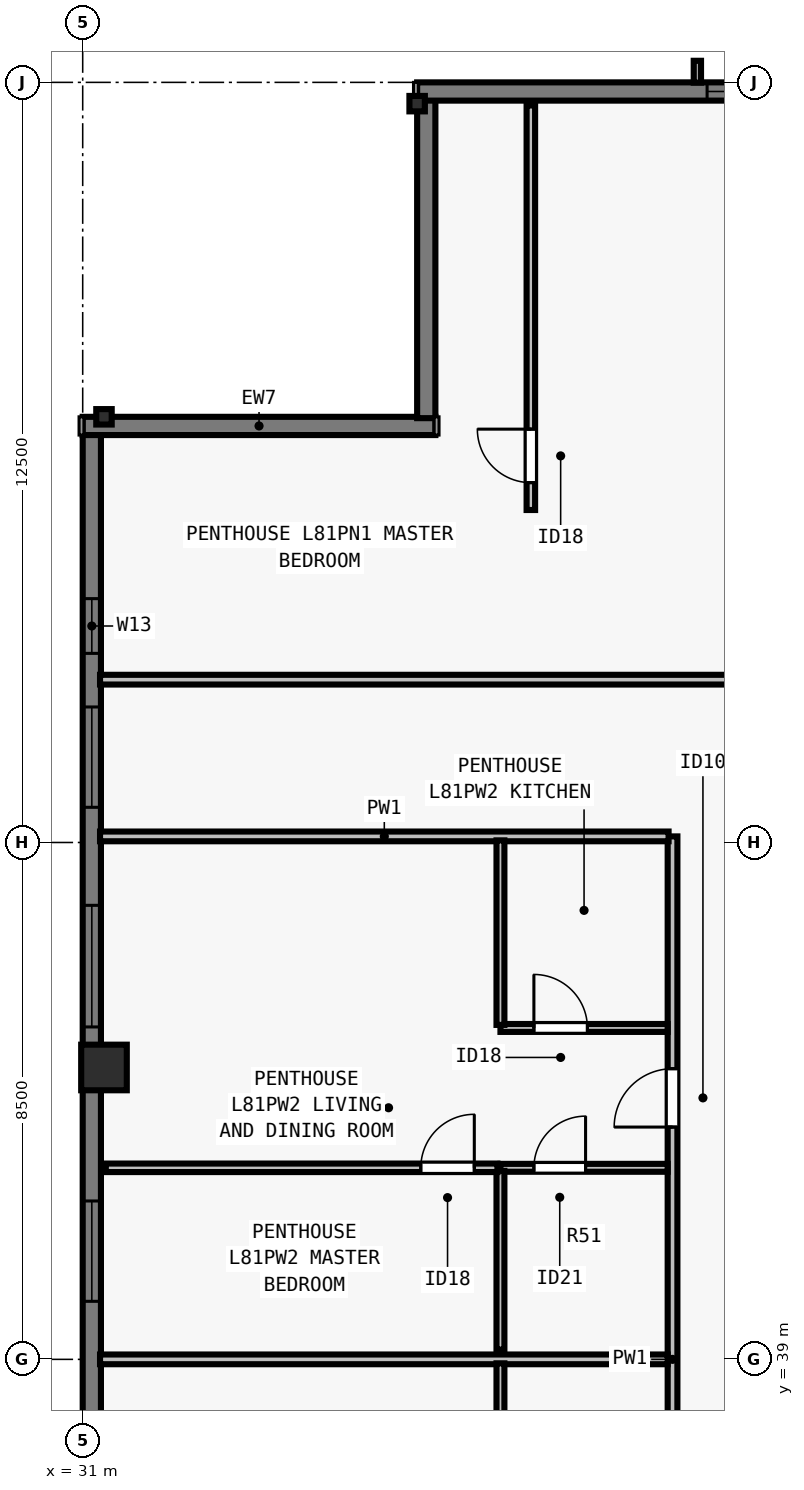
"""IFC4 building model, lengths in metres.
Left out: names, types, materials, properties, quantities, classifications, styles, units other than length and angle.
Written with IfcOpenShell. Run it as: python <this file> out.ifc"""

import sys

from ifc_helpers import new_model, si_unit, direction, frame, frame_2d, origin, origin_2d, place, context, subcontext, project, spatial, rectangle, i_section, extrude, element, fill, save


model = new_model("IFC4")
c1 = context("Model", 3, precision=1e-05, world=origin(), true_north=direction((0.0, 1.0)))
c2 = subcontext(c1, "Body", "Model", "MODEL_VIEW")
j1 = project(units=[si_unit("LENGTHUNIT", "METRE"), si_unit("PLANEANGLEUNIT", "RADIAN")], contexts=[c1])
p1 = place(None, origin())
s1 = spatial("IfcSite", under=j1, at=p1, CompositionType="ELEMENT")
p2 = place(p1, origin())
s2 = spatial("IfcBuilding", under=s1, at=p2, CompositionType="ELEMENT")
p3 = place(p2, frame((0.0, 0.0, 294.5)))
s3 = spatial("IfcBuildingStorey", under=s2, at=p3, CompositionType="ELEMENT", Elevation=294.5)
for number, where, z_axis, x_axis in (
    (1, (36.5, 59.65, 0.0), (0.0, 0.0, 1.0), (1.0, 0.0, 0.0)),
    (2, (31.35, 54.5, 0.0), (0.0, 0.0, 1.0), (0.0, 1.0, 0.0)),
):
    element("IfcColumn", number, at=place(p3, frame(where, z_axis=z_axis, x_axis=x_axis)), inside=s3, PredefinedType="COLUMN", context=c2, shape_type="SweptSolid", body=[
        extrude(i_section(OverallWidth=0.254, OverallDepth=0.254, WebThickness=0.009, FlangeThickness=0.014, FilletRadius=0.013, at=origin_2d()), origin(), (0.0, 0.0, 1.0), 3.5),
    ])
p4 = place(p3, frame((31.35, 43.8, 0.0), z_axis=(0.0, 0.0, 1.0), x_axis=(0.0, 1.0, 0.0)))
e3 = element("IfcColumn", 3, at=p4, inside=s3, PredefinedType="COLUMN", context=c2, shape_type="SweptSolid", body=[
    extrude(rectangle(XDim=0.75, YDim=0.75, at=origin_2d()), origin(), (0.0, 0.0, 1.0), 3.5),
])
p5 = place(p3, frame((31.15, 23.5, 0.0), z_axis=(0.0, 0.0, 1.0), x_axis=(0.0, 1.0, 0.0)))
e4 = element("IfcWall", 4, at=p5, inside=s3, PredefinedType="SOLIDWALL", context=c2, shape_type="SweptSolid", body=[
    extrude(rectangle(XDim=30.722, YDim=0.3, at=frame_2d((15.361, 0.0))), origin(), (0.0, 0.0, 1.0), 3.29),
])
p6 = place(p5, frame((7.93, 0.0, 0.8)))
e5 = element("IfcOpeningElement", 5, at=p6, cuts=e4, PredefinedType="OPENING", context=c2, shape_type="SweptSolid", body=[
    extrude(rectangle(XDim=1.65, YDim=1.758, at=frame_2d((0.825, 0.879))), frame((0.0, 0.16, 0.0), z_axis=(0.0, -1.0, 0.0), x_axis=(1.0, 0.0, 0.0)), (0.0, 0.0, 1.0), 0.32),
])
p7 = place(p5, frame((12.442, 0.0, 0.8)))
e6 = element("IfcOpeningElement", 6, at=p7, cuts=e4, PredefinedType="OPENING", context=c2, shape_type="SweptSolid", body=[
    extrude(rectangle(XDim=2.0, YDim=1.758, at=frame_2d((1.0, 0.879))), frame((0.0, 0.16, 0.0), z_axis=(0.0, -1.0, 0.0), x_axis=(1.0, 0.0, 0.0)), (0.0, 0.0, 1.0), 0.32),
])
p8 = place(p5, frame((16.455, 0.0, 0.8)))
e7 = element("IfcOpeningElement", 7, at=p8, cuts=e4, PredefinedType="OPENING", context=c2, shape_type="SweptSolid", body=[
    extrude(rectangle(XDim=1.65, YDim=1.758, at=frame_2d((0.825, 0.879))), frame((0.0, 0.16, 0.0), z_axis=(0.0, -1.0, 0.0), x_axis=(1.0, 0.0, 0.0)), (0.0, 0.0, 1.0), 0.32),
])
p9 = place(p5, frame((20.967, 0.0, 0.8)))
e8 = element("IfcOpeningElement", 8, at=p9, cuts=e4, PredefinedType="OPENING", context=c2, shape_type="SweptSolid", body=[
    extrude(rectangle(XDim=2.0, YDim=1.758, at=frame_2d((1.0, 0.879))), frame((0.0, 0.16, 0.0), z_axis=(0.0, -1.0, 0.0), x_axis=(1.0, 0.0, 0.0)), (0.0, 0.0, 1.0), 0.32),
])
p10 = place(p5, frame((24.579, 0.0, 0.8)))
e9 = element("IfcOpeningElement", 9, at=p10, cuts=e4, PredefinedType="OPENING", context=c2, shape_type="SweptSolid", body=[
    extrude(rectangle(XDim=1.65, YDim=1.758, at=frame_2d((0.825, 0.879))), frame((0.0, 0.16, 0.0), z_axis=(0.0, -1.0, 0.0), x_axis=(1.0, 0.0, 0.0)), (0.0, 0.0, 1.0), 0.32),
])
p11 = place(p5, frame((27.11, 0.0, 0.8)))
e10 = element("IfcOpeningElement", 10, at=p11, cuts=e4, PredefinedType="OPENING", context=c2, shape_type="SweptSolid", body=[
    extrude(rectangle(XDim=0.9, YDim=1.75, at=frame_2d((0.45, 0.875))), frame((0.0, 0.16, 0.0), z_axis=(0.0, -1.0, 0.0), x_axis=(1.0, 0.0, 0.0)), (0.0, 0.0, 1.0), 0.32),
])
p12 = place(p3, frame((31.0, 54.35, 0.0), z_axis=(0.0, 0.0, 1.0), x_axis=(1.0, 0.0, 0.0)))
e11 = element("IfcWall", 11, at=p12, inside=s3, PredefinedType="SOLIDWALL", context=c2, shape_type="SweptSolid", body=[
    extrude(rectangle(XDim=5.8, YDim=0.3, at=frame_2d((2.9, 0.0))), origin(), (0.0, 0.0, 1.0), 3.29),
])
p13 = place(p3, frame((36.65, 54.478, 0.0), z_axis=(0.0, 0.0, 1.0), x_axis=(0.0, 1.0, 0.0)))
e12 = element("IfcWall", 12, at=p13, inside=s3, PredefinedType="SOLIDWALL", context=c2, shape_type="SweptSolid", body=[
    extrude(rectangle(XDim=5.244, YDim=0.3, at=frame_2d((2.622, 0.0))), origin(), (0.0, 0.0, 1.0), 3.29),
])
p14 = place(p3, frame((36.5, 59.85, 0.0), z_axis=(0.0, 0.0, 1.0), x_axis=(1.0, 0.0, 0.0)))
e13 = element("IfcWall", 13, at=p14, inside=s3, PredefinedType="SOLIDWALL", context=c2, shape_type="SweptSolid", body=[
    extrude(rectangle(XDim=30.722, YDim=0.3, at=frame_2d((15.361, 0.0))), origin(), (0.0, 0.0, 1.0), 3.29),
])
p15 = place(p14, frame((4.769, 0.0, 0.8)))
e14 = element("IfcOpeningElement", 14, at=p15, cuts=e13, PredefinedType="OPENING", context=c2, shape_type="SweptSolid", body=[
    extrude(rectangle(XDim=2.0, YDim=1.758, at=frame_2d((1.0, 0.879))), frame((0.0, 0.16, 0.0), z_axis=(0.0, -1.0, 0.0), x_axis=(1.0, 0.0, 0.0)), (0.0, 0.0, 1.0), 0.32),
])
p16 = place(p14, frame((8.331, 0.0, 0.8)))
e15 = element("IfcOpeningElement", 15, at=p16, cuts=e13, PredefinedType="OPENING", context=c2, shape_type="SweptSolid", body=[
    extrude(rectangle(XDim=1.65, YDim=1.758, at=frame_2d((0.825, 0.879))), frame((0.0, 0.16, 0.0), z_axis=(0.0, -1.0, 0.0), x_axis=(1.0, 0.0, 0.0)), (0.0, 0.0, 1.0), 0.32),
])
p17 = place(p14, frame((12.442, 0.0, 0.8)))
e16 = element("IfcOpeningElement", 16, at=p17, cuts=e13, PredefinedType="OPENING", context=c2, shape_type="SweptSolid", body=[
    extrude(rectangle(XDim=2.0, YDim=1.758, at=frame_2d((1.0, 0.879))), frame((0.0, 0.16, 0.0), z_axis=(0.0, -1.0, 0.0), x_axis=(1.0, 0.0, 0.0)), (0.0, 0.0, 1.0), 0.32),
])
p18 = place(p14, frame((17.304, 0.0, 0.8)))
e17 = element("IfcOpeningElement", 17, at=p18, cuts=e13, PredefinedType="OPENING", context=c2, shape_type="SweptSolid", body=[
    extrude(rectangle(XDim=1.65, YDim=1.758, at=frame_2d((0.825, 0.879))), frame((0.0, 0.16, 0.0), z_axis=(0.0, -1.0, 0.0), x_axis=(1.0, 0.0, 0.0)), (0.0, 0.0, 1.0), 0.32),
])
p19 = place(p14, frame((24.128, 0.0, 0.8)))
e18 = element("IfcOpeningElement", 18, at=p19, cuts=e13, PredefinedType="OPENING", context=c2, shape_type="SweptSolid", body=[
    extrude(rectangle(XDim=1.65, YDim=1.758, at=frame_2d((0.825, 0.879))), frame((0.0, 0.16, 0.0), z_axis=(0.0, -1.0, 0.0), x_axis=(1.0, 0.0, 0.0)), (0.0, 0.0, 1.0), 0.32),
])
p20 = place(p3, frame((31.285, 50.177, 0.0), z_axis=(0.0, 0.0, 1.0), x_axis=(1.0, 0.0, 0.0)))
e19 = element("IfcWall", 19, at=p20, inside=s3, PredefinedType="PARTITIONING", context=c2, shape_type="SweptSolid", body=[
    extrude(rectangle(XDim=41.43, YDim=0.16, at=frame_2d((20.715, 0.0))), origin(), (0.0, 0.0, 1.0), 3.009),
])
p21 = place(p20, frame((20.235, 0.0, 0.0)))
e20 = element("IfcOpeningElement", 20, at=p21, cuts=e19, PredefinedType="OPENING", context=c2, shape_type="SweptSolid", body=[
    extrude(rectangle(XDim=0.96, YDim=2.18, at=frame_2d((0.48, 1.09))), frame((0.0, 0.09, 0.0), z_axis=(0.0, -1.0, 0.0), x_axis=(1.0, 0.0, 0.0)), (0.0, 0.0, 1.0), 0.18),
])
p22 = place(p3, frame((40.7, 30.4, 0.0), z_axis=(0.0, 0.0, 1.0), x_axis=(0.0, 1.0, 0.0)))
e21 = element("IfcWall", 21, at=p22, inside=s3, PredefinedType="PARTITIONING", context=c2, shape_type="SweptSolid", body=[
    extrude(rectangle(XDim=17.2, YDim=0.16, at=frame_2d((8.6, 0.0))), origin(), (0.0, 0.0, 1.0), 3.009),
])
p23 = place(p22, frame((3.82, 0.0, 0.0)))
e22 = element("IfcOpeningElement", 22, at=p23, cuts=e21, PredefinedType="OPENING", context=c2, shape_type="SweptSolid", body=[
    extrude(rectangle(XDim=0.96, YDim=2.18, at=frame_2d((0.48, 1.09))), frame((0.0, 0.09, 0.0), z_axis=(0.0, -1.0, 0.0), x_axis=(1.0, 0.0, 0.0)), (0.0, 0.0, 1.0), 0.18),
])
p24 = place(p22, frame((12.42, 0.0, 0.0)))
e23 = element("IfcOpeningElement", 23, at=p24, cuts=e21, PredefinedType="OPENING", context=c2, shape_type="SweptSolid", body=[
    extrude(rectangle(XDim=0.96, YDim=2.18, at=frame_2d((0.48, 1.09))), frame((0.0, 0.09, 0.0), z_axis=(0.0, -1.0, 0.0), x_axis=(1.0, 0.0, 0.0)), (0.0, 0.0, 1.0), 0.18),
])
p25 = place(p3, frame((31.285, 47.6, 0.0), z_axis=(0.0, 0.0, 1.0), x_axis=(1.0, 0.0, 0.0)))
e24 = element("IfcWall", 24, at=p25, inside=s3, PredefinedType="PARTITIONING", context=c2, shape_type="SweptSolid", body=[
    extrude(rectangle(XDim=9.35, YDim=0.16, at=frame_2d((4.675, 0.0))), origin(), (0.0, 0.0, 1.0), 3.29),
])
p26 = place(p3, frame((38.37, 52.968, 0.0), z_axis=(0.0, 0.0, 1.0), x_axis=(0.0, 1.0, 0.0)))
e25 = element("IfcWall", 25, at=p26, inside=s3, PredefinedType="PARTITIONING", context=c2, shape_type="SweptSolid", body=[
    extrude(rectangle(XDim=6.653, YDim=0.14, at=frame_2d((3.326, 0.0))), origin(), (0.0, 0.0, 1.0), 2.653),
])
p27 = place(p26, frame((0.45, 0.0, 0.0)))
e26 = element("IfcOpeningElement", 26, at=p27, cuts=e25, PredefinedType="OPENING", context=c2, shape_type="SweptSolid", body=[
    extrude(rectangle(XDim=0.88, YDim=2.1, at=frame_2d((0.44, 1.05))), frame((0.0, 0.08, 0.0), z_axis=(0.0, -1.0, 0.0), x_axis=(1.0, 0.0, 0.0)), (0.0, 0.0, 1.0), 0.16),
])
p28 = place(p3, frame((31.285, 39.0, 0.0), z_axis=(0.0, 0.0, 1.0), x_axis=(1.0, 0.0, 0.0)))
e27 = element("IfcWall", 27, at=p28, inside=s3, PredefinedType="PARTITIONING", context=c2, shape_type="SweptSolid", body=[
    extrude(rectangle(XDim=9.335, YDim=0.16, at=frame_2d((4.667, 0.0))), origin(), (0.0, 0.0, 1.0), 3.29),
])
p29 = place(p3, frame((37.87, 35.9, 0.0), z_axis=(0.0, 0.0, 1.0), x_axis=(0.0, 1.0, 0.0)))
e28 = element("IfcWall", 28, at=p29, inside=s3, PredefinedType="PLUMBINGWALL", context=c2, shape_type="SweptSolid", body=[
    extrude(rectangle(XDim=3.035, YDim=0.13, at=frame_2d((1.518, 0.0))), origin(), (0.0, 0.0, 1.0), 3.29),
])
p30 = place(p3, frame((37.87, 42.15, 0.0), z_axis=(0.0, 0.0, 1.0), x_axis=(1.0, 0.0, 0.0)))
e29 = element("IfcWall", 29, at=p30, inside=s3, PredefinedType="PLUMBINGWALL", context=c2, shape_type="SweptSolid", body=[
    extrude(rectangle(XDim=2.75, YDim=0.13, at=frame_2d((1.375, 0.0))), origin(), (0.0, 0.0, 1.0), 3.29),
])
p31 = place(p30, frame((0.55, 0.0, 0.0)))
e30 = element("IfcOpeningElement", 30, at=p31, cuts=e29, PredefinedType="OPENING", context=c2, shape_type="SweptSolid", body=[
    extrude(rectangle(XDim=0.85, YDim=2.08, at=frame_2d((0.425, 1.04))), frame((0.0, 0.075, 0.0), z_axis=(0.0, -1.0, 0.0), x_axis=(1.0, 0.0, 0.0)), (0.0, 0.0, 1.0), 0.15),
])
p32 = place(p3, frame((37.87, 39.16, 0.0), z_axis=(0.0, 0.0, 1.0), x_axis=(0.0, 1.0, 0.0)))
e31 = element("IfcWall", 31, at=p32, inside=s3, PredefinedType="PLUMBINGWALL", context=c2, shape_type="SweptSolid", body=[
    extrude(rectangle(XDim=2.94, YDim=0.13, at=frame_2d((1.47, 0.0))), origin(), (0.0, 0.0, 1.0), 3.009),
])
p33 = place(p3, frame((37.87, 44.45, 0.0), z_axis=(0.0, 0.0, 1.0), x_axis=(1.0, 0.0, 0.0)))
e32 = element("IfcWall", 32, at=p33, inside=s3, PredefinedType="PLUMBINGWALL", context=c2, shape_type="SweptSolid", body=[
    extrude(rectangle(XDim=2.75, YDim=0.13, at=frame_2d((1.375, 0.0))), origin(), (0.0, 0.0, 1.0), 3.29),
])
p34 = place(p33, frame((0.55, 0.0, 0.0)))
e33 = element("IfcOpeningElement", 33, at=p34, cuts=e32, PredefinedType="OPENING", context=c2, shape_type="SweptSolid", body=[
    extrude(rectangle(XDim=0.88, YDim=2.1, at=frame_2d((0.44, 1.05))), frame((0.0, 0.075, 0.0), z_axis=(0.0, -1.0, 0.0), x_axis=(1.0, 0.0, 0.0)), (0.0, 0.0, 1.0), 0.15),
])
p35 = place(p3, frame((37.87, 44.5, 0.0), z_axis=(0.0, 0.0, 1.0), x_axis=(0.0, 1.0, 0.0)))
e34 = element("IfcWall", 34, at=p35, inside=s3, PredefinedType="PLUMBINGWALL", context=c2, shape_type="SweptSolid", body=[
    extrude(rectangle(XDim=3.035, YDim=0.13, at=frame_2d((1.518, 0.0))), origin(), (0.0, 0.0, 1.0), 3.29),
])
p36 = place(p3, frame((31.38, 42.15, 0.0), z_axis=(0.0, 0.0, 1.0), x_axis=(1.0, 0.0, 0.0)))
e35 = element("IfcWall", 35, at=p36, inside=s3, PredefinedType="PARTITIONING", context=c2, shape_type="SweptSolid", body=[
    extrude(rectangle(XDim=6.44, YDim=0.14, at=frame_2d((3.22, 0.0))), origin(), (0.0, 0.0, 1.0), 3.29),
])
p37 = place(p36, frame((5.18, 0.0, 0.0)))
e36 = element("IfcOpeningElement", 36, at=p37, cuts=e35, PredefinedType="OPENING", context=c2, shape_type="SweptSolid", body=[
    extrude(rectangle(XDim=0.88, YDim=2.1, at=frame_2d((0.44, 1.05))), frame((0.0, 0.08, 0.0), z_axis=(0.0, -1.0, 0.0), x_axis=(1.0, 0.0, 0.0)), (0.0, 0.0, 1.0), 0.16),
])
p38 = place(p8, origin())
e37 = element("IfcWindow", 37, at=p38, inside=s3, PartitioningType="SINGLE_PANEL", PredefinedType="WINDOW", context=c2, shape_type="SweptSolid", body=[
    extrude(rectangle(XDim=1.65, YDim=1.758, at=frame_2d((0.825, 0.879))), frame((0.0, -0.05, 0.0), z_axis=(0.0, -1.0, 0.0), x_axis=(1.0, 0.0, 0.0)), (0.0, 0.0, 1.0), 0.06),
])
fill(e7, e37)
p39 = place(p9, origin())
e38 = element("IfcWindow", 38, at=p39, inside=s3, PartitioningType="SINGLE_PANEL", PredefinedType="WINDOW", context=c2, shape_type="SweptSolid", body=[
    extrude(rectangle(XDim=2.0, YDim=1.758, at=frame_2d((1.0, 0.879))), frame((0.0, -0.05, 0.0), z_axis=(0.0, -1.0, 0.0), x_axis=(1.0, 0.0, 0.0)), (0.0, 0.0, 1.0), 0.06),
])
fill(e8, e38)
p40 = place(p10, origin())
e39 = element("IfcWindow", 39, at=p40, inside=s3, PartitioningType="SINGLE_PANEL", PredefinedType="WINDOW", context=c2, shape_type="SweptSolid", body=[
    extrude(rectangle(XDim=1.65, YDim=1.758, at=frame_2d((0.825, 0.879))), frame((0.0, -0.05, 0.0), z_axis=(0.0, -1.0, 0.0), x_axis=(1.0, 0.0, 0.0)), (0.0, 0.0, 1.0), 0.06),
])
fill(e9, e39)
p41 = place(p15, origin())
e40 = element("IfcWindow", 40, at=p41, inside=s3, PartitioningType="SINGLE_PANEL", PredefinedType="WINDOW", context=c2, shape_type="SweptSolid", body=[
    extrude(rectangle(XDim=2.0, YDim=1.758, at=frame_2d((1.0, 0.879))), frame((0.0, -0.05, 0.0), z_axis=(0.0, -1.0, 0.0), x_axis=(1.0, 0.0, 0.0)), (0.0, 0.0, 1.0), 0.06),
])
fill(e14, e40)
p42 = place(p11, origin())
e41 = element("IfcWindow", 41, at=p42, inside=s3, PartitioningType="SINGLE_PANEL", PredefinedType="WINDOW", context=c2, shape_type="SweptSolid", body=[
    extrude(rectangle(XDim=0.9, YDim=1.75, at=frame_2d((0.45, 0.875))), frame((0.0, -0.04, 0.0), z_axis=(0.0, -1.0, 0.0), x_axis=(1.0, 0.0, 0.0)), (0.0, 0.0, 1.0), 0.06),
])
fill(e10, e41)
p43 = place(p27, origin())
e42 = element("IfcDoor", 42, at=p43, inside=s3, OperationType="SINGLE_SWING_RIGHT", PredefinedType="DOOR", context=c2, shape_type="SweptSolid", body=[
    extrude(rectangle(XDim=0.88, YDim=2.1, at=frame_2d((0.44, 1.05))), frame((0.0, 0.025, 0.0), z_axis=(0.0, -1.0, 0.0), x_axis=(1.0, 0.0, 0.0)), (0.0, 0.0, 1.0), 0.05),
])
fill(e26, e42)
p44 = place(p31, origin())
e43 = element("IfcDoor", 43, at=p44, inside=s3, OperationType="SINGLE_SWING_RIGHT", PredefinedType="DOOR", context=c2, shape_type="SweptSolid", body=[
    extrude(rectangle(XDim=0.85, YDim=2.08, at=frame_2d((0.425, 1.04))), frame((0.0, 0.025, 0.0), z_axis=(0.0, -1.0, 0.0), x_axis=(1.0, 0.0, 0.0)), (0.0, 0.0, 1.0), 0.05),
])
fill(e30, e43)
p45 = place(p34, origin())
e44 = element("IfcDoor", 44, at=p45, inside=s3, OperationType="SINGLE_SWING_LEFT", PredefinedType="DOOR", context=c2, shape_type="SweptSolid", body=[
    extrude(rectangle(XDim=0.88, YDim=2.1, at=frame_2d((0.44, 1.05))), frame((0.0, 0.025, 0.0), z_axis=(0.0, -1.0, 0.0), x_axis=(1.0, 0.0, 0.0)), (0.0, 0.0, 1.0), 0.05),
])
fill(e33, e44)
p46 = place(p37, origin())
e45 = element("IfcDoor", 45, at=p46, inside=s3, OperationType="SINGLE_SWING_RIGHT", PredefinedType="DOOR", context=c2, shape_type="SweptSolid", body=[
    extrude(rectangle(XDim=0.88, YDim=2.1, at=frame_2d((0.44, 1.05))), frame((0.0, 0.025, 0.0), z_axis=(0.0, -1.0, 0.0), x_axis=(1.0, 0.0, 0.0)), (0.0, 0.0, 1.0), 0.05),
])
fill(e36, e45)
p47 = place(p24, origin())
e46 = element("IfcDoor", 46, at=p47, inside=s3, OperationType="SINGLE_SWING_LEFT", PredefinedType="DOOR", context=c2, shape_type="SweptSolid", body=[
    extrude(rectangle(XDim=0.96, YDim=2.18, at=frame_2d((0.48, 1.09))), frame((0.0, 0.025, 0.0), z_axis=(0.0, -1.0, 0.0), x_axis=(1.0, 0.0, 0.0)), (0.0, 0.0, 1.0), 0.05),
])
fill(e23, e46)
save(model, sys.argv[1])
